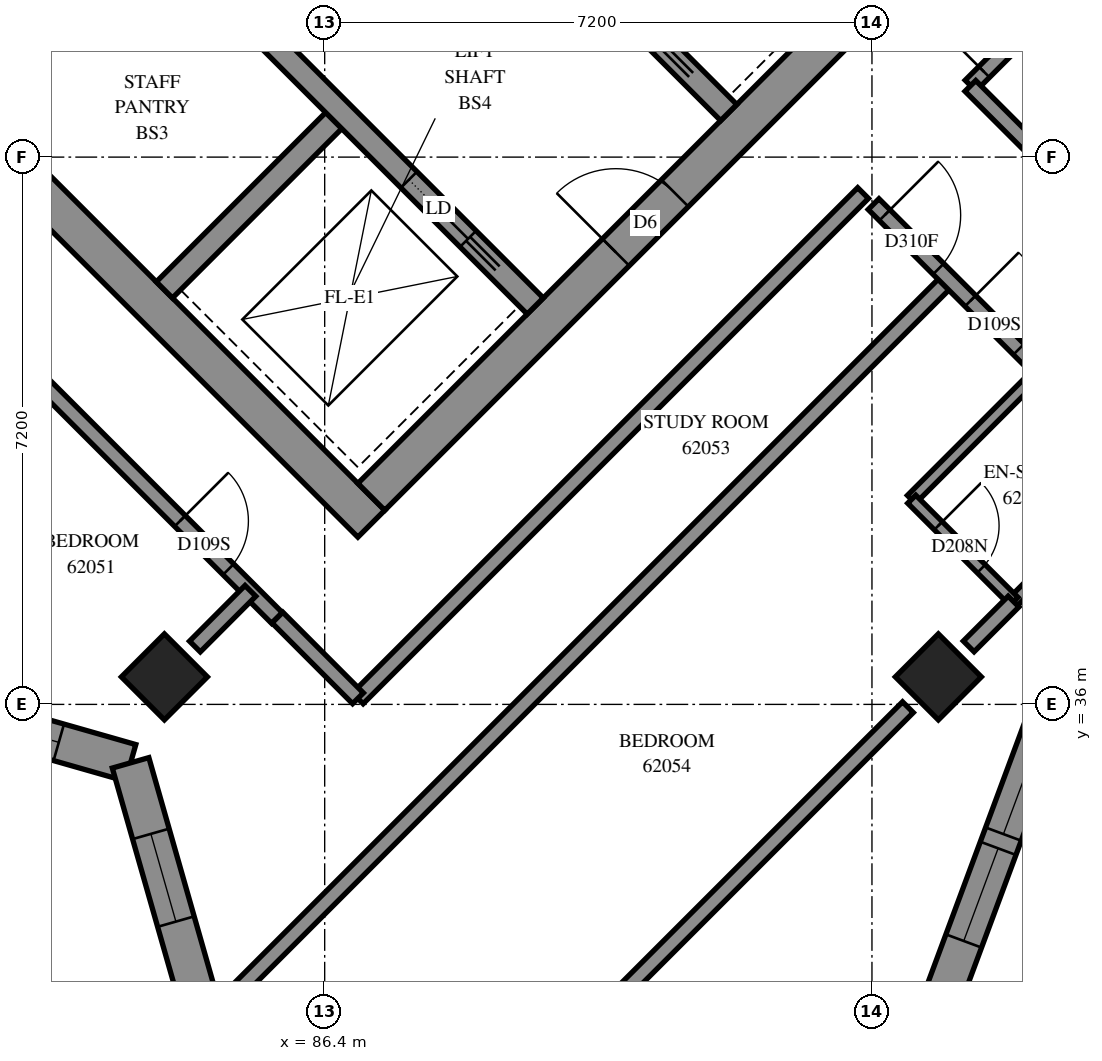
"""IFC4 building model, lengths in metres.
Left out: names, types, materials, properties, quantities, classifications, styles, units other than length and angle.
Written with IfcOpenShell. Run it as: python <this file> out.ifc"""

import sys

from ifc_helpers import new_model, si_unit, direction, frame, frame_2d, origin, origin_2d, place, context, subcontext, project, spatial, polyline, rectangle, outline, extrude, element, fill, save


model = new_model("IFC4")
c1 = context("Model", 3, precision=1e-05, world=origin(), true_north=direction((0.0, 1.0)))
c2 = subcontext(c1, "Body", "Model", "MODEL_VIEW")
j1 = project(units=[si_unit("LENGTHUNIT", "METRE"), si_unit("PLANEANGLEUNIT", "RADIAN")], contexts=[c1])
p1 = place(None, origin())
s1 = spatial("IfcSite", under=j1, at=p1, CompositionType="ELEMENT")
p2 = place(p1, origin())
s2 = spatial("IfcBuilding", under=s1, at=p2, CompositionType="ELEMENT")
p3 = place(p2, frame((0.0, 0.0, 227.0)))
s3 = spatial("IfcBuildingStorey", under=s2, at=p3, CompositionType="ELEMENT", Elevation=227.0)
for number, where, z_axis, x_axis in (
    (1, (84.291, 36.362, 0.0), (0.0, 0.0, 1.0), (0.707, -0.707, 0.0)),
    (2, (94.474, 36.362, 0.0), (0.0, 0.0, 1.0), (0.707, -0.707, 0.0)),
):
    element("IfcColumn", number, at=place(p3, frame(where, z_axis=z_axis, x_axis=x_axis)), inside=s3, PredefinedType="COLUMN", context=c2, shape_type="SweptSolid", body=[
        extrude(rectangle(XDim=0.8, YDim=0.8, at=origin_2d()), origin(), (0.0, 0.0, 1.0), 3.1),
    ])
p4 = place(p3, frame((76.124, 49.267, -0.3), z_axis=(0.0, 0.0, 1.0), x_axis=(0.7071067812, -0.7071067812, 0.0)))
e3 = element("IfcWall", 3, at=p4, inside=s3, PredefinedType="SHEAR", context=c2, shape_type="SweptSolid", body=[
    extrude(rectangle(XDim=15.4, YDim=0.5, at=frame_2d((7.7, 0.0))), origin(), (0.0, 0.0, 1.0), 2.7),
])
p5 = place(p3, frame((87.013, 38.731, -0.3), z_axis=(0.0, 0.0, 1.0), x_axis=(0.7071067812, 0.7071067812, 0.0)))
e4 = element("IfcWall", 4, at=p5, inside=s3, PredefinedType="SHEAR", context=c2, shape_type="SweptSolid", body=[
    extrude(rectangle(XDim=14.4, YDim=0.5, at=frame_2d((7.2, 0.0))), origin(), (0.0, 0.0, 1.0), 2.7),
])
p6 = place(p5, frame((4.55, 0.0, 0.3)))
e5 = element("IfcOpeningElement", 5, at=p6, cuts=e4, PredefinedType="OPENING", context=c2, shape_type="SweptSolid", body=[
    extrude(rectangle(XDim=1.1, YDim=2.1, at=frame_2d((0.55, 1.05))), frame((0.0, 0.26, 0.0), z_axis=(0.0, -1.0, 0.0), x_axis=(1.0, 0.0, 0.0)), (0.0, 0.0, 1.0), 0.52),
])
p7 = place(p5, frame((11.35, 0.0, 0.3)))
e6 = element("IfcOpeningElement", 6, at=p7, cuts=e4, PredefinedType="OPENING", context=c2, shape_type="SweptSolid", body=[
    extrude(rectangle(XDim=1.1, YDim=2.1, at=frame_2d((0.55, 1.05))), frame((0.0, 0.26, 0.0), z_axis=(0.0, -1.0, 0.0), x_axis=(1.0, 0.0, 0.0)), (0.0, 0.0, 1.0), 0.52),
])
for number, where, z_axis, x_axis in (
    (7, (81.746, 43.999, 0.0), (0.0, 0.0, 1.0), (0.707, 0.707, 0.0)),
    (8, (84.291, 41.453, 0.0), (0.0, 0.0, 1.0), (0.707, 0.707, 0.0)),
):
    element("IfcWall", number, at=place(p3, frame(where, z_axis=z_axis, x_axis=x_axis)), inside=s3, PredefinedType="SOLIDWALL", context=c2, shape_type="SweptSolid", body=[
        extrude(rectangle(XDim=3.3, YDim=0.3, at=frame_2d((1.65, 0.0))), origin(), (0.0, 0.0, 1.0), 3.1),
    ])
p8 = place(p3, frame((78.988, 51.423, 0.0), z_axis=(0.0, 0.0, 1.0), x_axis=(0.7071067812, -0.7071067812, 0.0)))
e9 = element("IfcWall", 9, at=p8, inside=s3, PredefinedType="SOLIDWALL", context=c2, shape_type="SweptSolid", body=[
    extrude(rectangle(XDim=14.4, YDim=0.3, at=frame_2d((7.2, 0.0))), origin(), (0.0, 0.0, 1.0), 3.1),
])
p9 = place(p8, frame((1.35, 0.0, 0.0)))
e10 = element("IfcOpeningElement", 10, at=p9, cuts=e9, PredefinedType="OPENING", context=c2, shape_type="SweptSolid", body=[
    extrude(rectangle(XDim=0.9, YDim=2.1, at=frame_2d((0.45, 1.05))), frame((0.0, 0.16, 0.0), z_axis=(0.0, -1.0, 0.0), x_axis=(1.0, 0.0, 0.0)), (0.0, 0.0, 1.0), 0.32),
])
p10 = place(p8, frame((4.95, 0.0, 0.0)))
e11 = element("IfcOpeningElement", 11, at=p10, cuts=e9, PredefinedType="OPENING", context=c2, shape_type="SweptSolid", body=[
    extrude(rectangle(XDim=0.9, YDim=2.1, at=frame_2d((0.45, 1.05))), frame((0.0, 0.16, 0.0), z_axis=(0.0, -1.0, 0.0), x_axis=(1.0, 0.0, 0.0)), (0.0, 0.0, 1.0), 0.32),
])
p11 = place(p8, frame((8.55, 0.0, 0.0)))
e12 = element("IfcOpeningElement", 12, at=p11, cuts=e9, PredefinedType="OPENING", context=c2, shape_type="SweptSolid", body=[
    extrude(rectangle(XDim=0.9, YDim=2.1, at=frame_2d((0.45, 1.05))), frame((0.0, 0.16, 0.0), z_axis=(0.0, -1.0, 0.0), x_axis=(1.0, 0.0, 0.0)), (0.0, 0.0, 1.0), 0.32),
])
p12 = place(p8, frame((12.05, 0.0, 0.0)))
e13 = element("IfcOpeningElement", 13, at=p12, cuts=e9, PredefinedType="OPENING", context=c2, shape_type="SweptSolid", body=[
    extrude(rectangle(XDim=1.1, YDim=2.1, at=frame_2d((0.55, 1.05))), frame((0.0, 0.16, 0.0), z_axis=(0.0, -1.0, 0.0), x_axis=(1.0, 0.0, 0.0)), (0.0, 0.0, 1.0), 0.32),
])
p13 = place(p3, frame((81.534, 53.969, 0.0), z_axis=(0.0, 0.0, 1.0), x_axis=(0.707103309, -0.7071102534, 0.0)))
e14 = element("IfcWall", 14, at=p13, inside=s3, PredefinedType="SOLIDWALL", context=c2, shape_type="SweptSolid", body=[
    extrude(rectangle(XDim=14.4, YDim=0.3, at=frame_2d((7.2, 0.0))), origin(), (0.0, 0.0, 1.0), 3.1),
])
p14 = place(p13, frame((1.25, 0.0, 0.0)))
e15 = element("IfcOpeningElement", 15, at=p14, cuts=e14, PredefinedType="OPENING", context=c2, shape_type="SweptSolid", body=[
    extrude(rectangle(XDim=1.1, YDim=2.1, at=frame_2d((0.55, 1.05))), frame((0.0, 0.16, 0.0), z_axis=(0.0, -1.0, 0.0), x_axis=(1.0, 0.0, 0.0)), (0.0, 0.0, 1.0), 0.32),
])
p15 = place(p13, frame((4.85, 0.0, 0.0)))
e16 = element("IfcOpeningElement", 16, at=p15, cuts=e14, PredefinedType="OPENING", context=c2, shape_type="SweptSolid", body=[
    extrude(rectangle(XDim=1.1, YDim=2.1, at=frame_2d((0.55, 1.05))), frame((0.0, 0.16, 0.0), z_axis=(0.0, -1.0, 0.0), x_axis=(1.0, 0.0, 0.0)), (0.0, 0.0, 1.0), 0.32),
])
p16 = place(p13, frame((8.45, 0.0, 0.0)))
e17 = element("IfcOpeningElement", 17, at=p16, cuts=e14, PredefinedType="OPENING", context=c2, shape_type="SweptSolid", body=[
    extrude(rectangle(XDim=1.1, YDim=2.1, at=frame_2d((0.55, 1.05))), frame((0.0, 0.16, 0.0), z_axis=(0.0, -1.0, 0.0), x_axis=(1.0, 0.0, 0.0)), (0.0, 0.0, 1.0), 0.32),
])
p17 = place(p13, frame((12.05, 0.0, 0.0)))
e18 = element("IfcOpeningElement", 18, at=p17, cuts=e14, PredefinedType="OPENING", context=c2, shape_type="SweptSolid", body=[
    extrude(rectangle(XDim=1.1, YDim=2.1, at=frame_2d((0.55, 1.05))), frame((0.0, 0.16, 0.0), z_axis=(0.0, -1.0, 0.0), x_axis=(1.0, 0.0, 0.0)), (0.0, 0.0, 1.0), 0.32),
])
p18 = place(p3, frame((94.281, 31.47, 0.0), z_axis=(0.0, 0.0, 1.0), x_axis=(0.3481903374, 0.9374238577, 0.0)))
e19 = element("IfcWall", 19, at=p18, inside=s3, PredefinedType="SOLIDWALL", context=c2, shape_type="SweptSolid", body=[
    extrude(outline(polyline([(-0.12, -0.25), (5.16, -0.25), (5.39, 0.25), (0.12, 0.25), (-0.12, -0.25)])), origin(), (0.0, 0.0, 1.0), 3.1),
])
p19 = place(p18, frame((1.512, 0.0, 0.45)))
e20 = element("IfcOpeningElement", 20, at=p19, cuts=e19, PredefinedType="OPENING", context=c2, shape_type="SweptSolid", body=[
    extrude(rectangle(XDim=1.3, YDim=2.5, at=frame_2d((0.65, 1.25))), frame((0.0, 0.26, 0.0), z_axis=(0.0, -1.0, 0.0), x_axis=(1.0, 0.0, 0.0)), (0.0, 0.0, 1.0), 0.52),
])
p20 = place(p18, frame((3.012, 0.0, 0.45)))
e21 = element("IfcOpeningElement", 21, at=p20, cuts=e19, PredefinedType="OPENING", context=c2, shape_type="SweptSolid", body=[
    extrude(rectangle(XDim=1.3, YDim=2.5, at=frame_2d((0.65, 1.25))), frame((0.0, 0.26, 0.0), z_axis=(0.0, -1.0, 0.0), x_axis=(1.0, 0.0, 0.0)), (0.0, 0.0, 1.0), 0.52),
])
p21 = place(p3, frame((79.499, 36.472, 0.0), z_axis=(0.0, 0.0, 1.0), x_axis=(0.9615973563, -0.2744640675, 0.0)))
e22 = element("IfcWall", 22, at=p21, inside=s3, PredefinedType="SOLIDWALL", context=c2, shape_type="SweptSolid", body=[
    extrude(outline(polyline([(-0.145, -0.25), (4.383, -0.25), (4.661, 0.25), (0.145, 0.25), (-0.145, -0.25)])), origin(), (0.0, 0.0, 1.0), 3.1),
])
p22 = place(p21, frame((0.489, 0.0, 0.45)))
e23 = element("IfcOpeningElement", 23, at=p22, cuts=e22, PredefinedType="OPENING", context=c2, shape_type="SweptSolid", body=[
    extrude(rectangle(XDim=1.3, YDim=2.5, at=frame_2d((0.65, 1.25))), frame((0.0, 0.26, 0.0), z_axis=(0.0, -1.0, 0.0), x_axis=(1.0, 0.0, 0.0)), (0.0, 0.0, 1.0), 0.52),
])
p23 = place(p21, frame((2.239, 0.0, 0.45)))
e24 = element("IfcOpeningElement", 24, at=p23, cuts=e22, PredefinedType="OPENING", context=c2, shape_type="SweptSolid", body=[
    extrude(rectangle(XDim=1.3, YDim=2.5, at=frame_2d((0.65, 1.25))), frame((0.0, 0.26, 0.0), z_axis=(0.0, -1.0, 0.0), x_axis=(1.0, 0.0, 0.0)), (0.0, 0.0, 1.0), 0.52),
])
p24 = place(p3, frame((83.846, 35.231, 0.0), z_axis=(0.0, 0.0, 1.0), x_axis=(0.2744640675, -0.9615973563, 0.0)))
e25 = element("IfcWall", 25, at=p24, inside=s3, PredefinedType="SOLIDWALL", context=c2, shape_type="SweptSolid", body=[
    extrude(outline(polyline([(0.139, -0.25), (4.667, -0.25), (4.376, 0.25), (-0.139, 0.25), (0.139, -0.25)])), origin(), (0.0, 0.0, 1.0), 3.1),
])
p25 = place(p24, frame((0.972, 0.0, 0.45)))
e26 = element("IfcOpeningElement", 26, at=p25, cuts=e25, PredefinedType="OPENING", context=c2, shape_type="SweptSolid", body=[
    extrude(rectangle(XDim=1.2, YDim=2.5, at=frame_2d((0.6, 1.25))), frame((0.0, 0.26, 0.0), z_axis=(0.0, -1.0, 0.0), x_axis=(1.0, 0.0, 0.0)), (0.0, 0.0, 1.0), 0.52),
])
p26 = place(p3, frame((85.026, 32.008, 0.0), z_axis=(0.0, 0.0, 1.0), x_axis=(0.7071030933, 0.707110469, 0.0)))
e27 = element("IfcWall", 27, at=p26, inside=s3, PredefinedType="PARTITIONING", context=c2, shape_type="SweptSolid", body=[
    extrude(rectangle(XDim=13.558, YDim=0.2, at=frame_2d((6.779, 0.0))), origin(), (0.0, 0.0, 1.0), 3.1),
])
p27 = place(p3, frame((86.835, 36.079, 0.0), z_axis=(0.0, 0.0, 1.0), x_axis=(0.7071067812, 0.7071067812, 0.0)))
e28 = element("IfcWall", 28, at=p27, inside=s3, PredefinedType="PARTITIONING", context=c2, shape_type="SweptSolid", body=[
    extrude(rectangle(XDim=9.402, YDim=0.2, at=frame_2d((4.701, 0.0))), origin(), (0.0, 0.0, 1.0), 3.1),
])
p28 = place(p3, frame((94.897, 44.141, 0.0), z_axis=(0.0, 0.0, 1.0), x_axis=(0.7071067812, 0.7071067812, 0.0)))
e29 = element("IfcWall", 29, at=p28, inside=s3, PredefinedType="PARTITIONING", context=c2, shape_type="SweptSolid", body=[
    extrude(rectangle(XDim=7.0, YDim=0.2, at=frame_2d((3.5, 0.0))), origin(), (0.0, 0.0, 1.0), 3.1),
])
p29 = place(p28, frame((0.253, 0.0, 0.0)))
e30 = element("IfcOpeningElement", 30, at=p29, cuts=e29, PredefinedType="OPENING", context=c2, shape_type="SweptSolid", body=[
    extrude(rectangle(XDim=1.0, YDim=2.1, at=frame_2d((0.5, 1.05))), frame((0.0, 0.11, 0.0), z_axis=(0.0, -1.0, 0.0), x_axis=(1.0, 0.0, 0.0)), (0.0, 0.0, 1.0), 0.22),
])
p30 = place(p3, frame((80.849, 42.061, 0.0), z_axis=(0.0, 0.0, 1.0), x_axis=(0.7071067812, -0.7071067812, 0.0)))
e31 = element("IfcWall", 31, at=p30, inside=s3, PredefinedType="PARTITIONING", context=c2, shape_type="SweptSolid", body=[
    extrude(rectangle(XDim=6.964, YDim=0.2, at=frame_2d((3.482, 0.0))), origin(), (0.0, 0.0, 1.0), 3.1),
])
p31 = place(p30, frame((5.159, 0.0, 0.0)))
e32 = element("IfcOpeningElement", 32, at=p31, cuts=e31, PredefinedType="OPENING", context=c2, shape_type="SweptSolid", body=[
    extrude(rectangle(XDim=0.9, YDim=2.1, at=frame_2d((0.45, 1.05))), frame((0.0, 0.11, 0.0), z_axis=(0.0, -1.0, 0.0), x_axis=(1.0, 0.0, 0.0)), (0.0, 0.0, 1.0), 0.22),
])
p32 = place(p3, frame((89.781, 31.671, 0.0), z_axis=(0.0, 0.0, 1.0), x_axis=(0.7071067812, 0.7071067812, 0.0)))
e33 = element("IfcWall", 33, at=p32, inside=s3, PredefinedType="PARTITIONING", context=c2, shape_type="SweptSolid", body=[
    extrude(rectangle(XDim=6.07, YDim=0.2, at=frame_2d((3.035, 0.0))), origin(), (0.0, 0.0, 1.0), 2.6),
])
p33 = place(p3, frame((94.895, 44.137, 0.0), z_axis=(0.0, 0.0, 1.0), x_axis=(0.7071067812, -0.7071067812, 0.0)))
e34 = element("IfcWall", 34, at=p33, inside=s3, PredefinedType="PARTITIONING", context=c2, shape_type="SweptSolid", body=[
    extrude(rectangle(XDim=5.199, YDim=0.2, at=frame_2d((2.599, 0.0))), origin(), (0.0, 0.0, 1.0), 3.1),
])
p34 = place(p33, frame((3.898, 0.0, 0.0)))
e35 = element("IfcOpeningElement", 35, at=p34, cuts=e34, PredefinedType="OPENING", context=c2, shape_type="SweptSolid", body=[
    extrude(rectangle(XDim=0.9, YDim=2.1, at=frame_2d((0.45, 1.05))), frame((0.0, 0.11, 0.0), z_axis=(0.0, -1.0, 0.0), x_axis=(1.0, 0.0, 0.0)), (0.0, 0.0, 1.0), 0.22),
])
p35 = place(p3, frame((93.621, 42.581, 0.0), z_axis=(0.0, 0.0, 1.0), x_axis=(0.7071067812, -0.7071067812, 0.0)))
e36 = element("IfcWall", 36, at=p35, inside=s3, PredefinedType="PARTITIONING", context=c2, shape_type="SweptSolid", body=[
    extrude(rectangle(XDim=3.1, YDim=0.2, at=frame_2d((1.55, 0.0))), origin(), (0.0, 0.0, 1.0), 3.1),
])
p36 = place(p35, frame((0.206, 0.0, 0.0)))
e37 = element("IfcOpeningElement", 37, at=p36, cuts=e36, PredefinedType="OPENING", context=c2, shape_type="SweptSolid", body=[
    extrude(rectangle(XDim=1.0, YDim=2.1, at=frame_2d((0.5, 1.05))), frame((0.0, 0.11, 0.0), z_axis=(0.0, -1.0, 0.0), x_axis=(1.0, 0.0, 0.0)), (0.0, 0.0, 1.0), 0.22),
])
p37 = place(p35, frame((1.8, 0.0, 0.0)))
e38 = element("IfcOpeningElement", 38, at=p37, cuts=e36, PredefinedType="OPENING", context=c2, shape_type="SweptSolid", body=[
    extrude(rectangle(XDim=0.9, YDim=2.1, at=frame_2d((0.45, 1.05))), frame((0.0, 0.11, 0.0), z_axis=(0.0, -1.0, 0.0), x_axis=(1.0, 0.0, 0.0)), (0.0, 0.0, 1.0), 0.22),
])
p38 = place(p3, frame((94.12, 38.697, 0.0), z_axis=(0.0, 0.0, 1.0), x_axis=(0.7071067812, 0.7071067812, 0.0)))
e39 = element("IfcWall", 39, at=p38, inside=s3, PredefinedType="PARTITIONING", context=c2, shape_type="SweptSolid", body=[
    extrude(rectangle(XDim=2.398, YDim=0.15, at=frame_2d((1.199, 0.0))), origin(), (0.0, 0.0, 1.0), 3.1),
])
p39 = place(p3, frame((95.463, 37.353, 0.0), z_axis=(0.0, 0.0, 1.0), x_axis=(0.7071067812, 0.7071067812, 0.0)))
e40 = element("IfcWall", 40, at=p39, inside=s3, PredefinedType="PARTITIONING", context=c2, shape_type="SweptSolid", body=[
    extrude(rectangle(XDim=2.398, YDim=0.15, at=frame_2d((1.199, 0.0))), origin(), (0.0, 0.0, 1.0), 2.6),
])
p40 = place(p3, frame((94.124, 38.7, 0.0), z_axis=(0.0, 0.0, 1.0), x_axis=(0.7071067812, -0.7071067812, 0.0)))
e41 = element("IfcWall", 41, at=p40, inside=s3, PredefinedType="PARTITIONING", context=c2, shape_type="SweptSolid", body=[
    extrude(rectangle(XDim=1.901, YDim=0.15, at=frame_2d((0.95, 0.0))), origin(), (0.0, 0.0, 1.0), 3.1),
])
p41 = place(p40, frame((0.494, 0.0, 0.0)))
e42 = element("IfcOpeningElement", 42, at=p41, cuts=e41, PredefinedType="OPENING", context=c2, shape_type="SweptSolid", body=[
    extrude(rectangle(XDim=0.8, YDim=2.1, at=frame_2d((0.4, 1.05))), frame((0.0, 0.085, 0.0), z_axis=(0.0, -1.0, 0.0), x_axis=(1.0, 0.0, 0.0)), (0.0, 0.0, 1.0), 0.17),
])
p42 = place(p3, frame((85.778, 37.142, 0.0), z_axis=(0.0, 0.0, 1.0), x_axis=(0.7064400143, -0.70777292, 0.0)))
e43 = element("IfcWall", 43, at=p42, inside=s3, PredefinedType="PARTITIONING", context=c2, shape_type="SweptSolid", body=[
    extrude(rectangle(XDim=1.5, YDim=0.2, at=frame_2d((0.75, 0.0))), origin(), (0.0, 0.0, 1.0), 3.1),
])
p43 = place(p3, frame((84.693, 36.761, 0.0), z_axis=(0.0, 0.0, 1.0), x_axis=(0.7061388061, 0.708073433, 0.0)))
e44 = element("IfcWall", 44, at=p43, inside=s3, PredefinedType="PARTITIONING", context=c2, shape_type="SweptSolid", body=[
    extrude(rectangle(XDim=1.034, YDim=0.2, at=frame_2d((0.517, 0.0))), origin(), (0.0, 0.0, 1.0), 3.1),
])
p44 = place(p3, frame((94.873, 36.763, 0.0), z_axis=(0.0, 0.0, 1.0), x_axis=(0.7071067812, 0.7071067812, 0.0)))
e45 = element("IfcWall", 45, at=p44, inside=s3, PredefinedType="PARTITIONING", context=c2, shape_type="SweptSolid", body=[
    extrude(rectangle(XDim=0.834, YDim=0.2, at=frame_2d((0.417, 0.0))), origin(), (0.0, 0.0, 1.0), 2.6),
])
p45 = place(p19, origin())
e46 = element("IfcWindow", 46, at=p45, inside=s3, PartitioningType="SINGLE_PANEL", PredefinedType="WINDOW", context=c2, shape_type="SweptSolid", body=[
    extrude(rectangle(XDim=1.3, YDim=2.5, at=frame_2d((0.65, 1.25))), frame((0.0, 0.18, 0.0), z_axis=(0.0, -1.0, 0.0), x_axis=(1.0, 0.0, 0.0)), (0.0, 0.0, 1.0), 0.06),
])
fill(e20, e46)
p46 = place(p20, origin())
e47 = element("IfcWindow", 47, at=p46, inside=s3, PartitioningType="SINGLE_PANEL", PredefinedType="WINDOW", context=c2, shape_type="SweptSolid", body=[
    extrude(rectangle(XDim=1.3, YDim=2.5, at=frame_2d((0.65, 1.25))), frame((0.0, 0.18, 0.0), z_axis=(0.0, -1.0, 0.0), x_axis=(1.0, 0.0, 0.0)), (0.0, 0.0, 1.0), 0.06),
])
fill(e21, e47)
p47 = place(p23, origin())
e48 = element("IfcWindow", 48, at=p47, inside=s3, PartitioningType="SINGLE_PANEL", PredefinedType="WINDOW", context=c2, shape_type="SweptSolid", body=[
    extrude(rectangle(XDim=1.3, YDim=2.5, at=frame_2d((0.65, 1.25))), frame((0.0, 0.18, 0.0), z_axis=(0.0, -1.0, 0.0), x_axis=(1.0, 0.0, 0.0)), (0.0, 0.0, 1.0), 0.06),
])
fill(e24, e48)
p48 = place(p25, origin())
e49 = element("IfcWindow", 49, at=p48, inside=s3, PartitioningType="SINGLE_PANEL", PredefinedType="WINDOW", context=c2, shape_type="SweptSolid", body=[
    extrude(rectangle(XDim=1.2, YDim=2.5, at=frame_2d((0.6, 1.25))), frame((0.0, 0.18, 0.0), z_axis=(0.0, -1.0, 0.0), x_axis=(1.0, 0.0, 0.0)), (0.0, 0.0, 1.0), 0.06),
])
fill(e26, e49)
p49 = place(p6, origin())
e50 = element("IfcDoor", 50, at=p49, inside=s3, OperationType="DOUBLE_DOOR_SINGLE_SWING", PredefinedType="DOOR", context=c2, shape_type="SweptSolid", body=[
    extrude(rectangle(XDim=1.1, YDim=2.1, at=frame_2d((0.55, 1.05))), frame((0.0, 0.025, 0.0), z_axis=(0.0, -1.0, 0.0), x_axis=(1.0, 0.0, 0.0)), (0.0, 0.0, 1.0), 0.05),
])
fill(e5, e50)
p50 = place(p12, origin())
e51 = element("IfcDoor", 51, at=p50, inside=s3, OperationType="SLIDING_TO_RIGHT", PredefinedType="DOOR", context=c2, shape_type="SweptSolid", body=[
    extrude(rectangle(XDim=1.1, YDim=2.1, at=frame_2d((0.55, 1.05))), frame((0.0, 0.025, 0.0), z_axis=(0.0, -1.0, 0.0), x_axis=(1.0, 0.0, 0.0)), (0.0, 0.0, 1.0), 0.05),
])
fill(e13, e51)
p51 = place(p29, origin())
e52 = element("IfcDoor", 52, at=p51, inside=s3, OperationType="SINGLE_SWING_RIGHT", PredefinedType="DOOR", context=c2, shape_type="SweptSolid", body=[
    extrude(rectangle(XDim=1.0, YDim=2.1, at=frame_2d((0.5, 1.05))), frame((0.0, 0.025, 0.0), z_axis=(0.0, -1.0, 0.0), x_axis=(1.0, 0.0, 0.0)), (0.0, 0.0, 1.0), 0.05),
])
fill(e30, e52)
p52 = place(p31, origin())
e53 = element("IfcDoor", 53, at=p52, inside=s3, OperationType="SINGLE_SWING_RIGHT", PredefinedType="DOOR", context=c2, shape_type="SweptSolid", body=[
    extrude(rectangle(XDim=0.9, YDim=2.1, at=frame_2d((0.45, 1.05))), frame((0.0, 0.025, 0.0), z_axis=(0.0, -1.0, 0.0), x_axis=(1.0, 0.0, 0.0)), (0.0, 0.0, 1.0), 0.05),
])
fill(e32, e53)
p53 = place(p36, origin())
e54 = element("IfcDoor", 54, at=p53, inside=s3, OperationType="SINGLE_SWING_RIGHT", PredefinedType="DOOR", context=c2, shape_type="SweptSolid", body=[
    extrude(rectangle(XDim=1.0, YDim=2.1, at=frame_2d((0.5, 1.05))), frame((0.0, 0.025, 0.0), z_axis=(0.0, -1.0, 0.0), x_axis=(1.0, 0.0, 0.0)), (0.0, 0.0, 1.0), 0.05),
])
fill(e37, e54)
p54 = place(p37, origin())
e55 = element("IfcDoor", 55, at=p54, inside=s3, OperationType="SINGLE_SWING_LEFT", PredefinedType="DOOR", context=c2, shape_type="SweptSolid", body=[
    extrude(rectangle(XDim=0.9, YDim=2.1, at=frame_2d((0.45, 1.05))), frame((0.0, 0.025, 0.0), z_axis=(0.0, -1.0, 0.0), x_axis=(1.0, 0.0, 0.0)), (0.0, 0.0, 1.0), 0.05),
])
fill(e38, e55)
p55 = place(p41, origin())
e56 = element("IfcDoor", 56, at=p55, inside=s3, OperationType="SINGLE_SWING_RIGHT", PredefinedType="DOOR", context=c2, shape_type="SweptSolid", body=[
    extrude(rectangle(XDim=0.8, YDim=2.1, at=frame_2d((0.4, 1.05))), frame((0.0, 0.025, 0.0), z_axis=(0.0, -1.0, 0.0), x_axis=(1.0, 0.0, 0.0)), (0.0, 0.0, 1.0), 0.05),
])
fill(e42, e56)
save(model, sys.argv[1])
